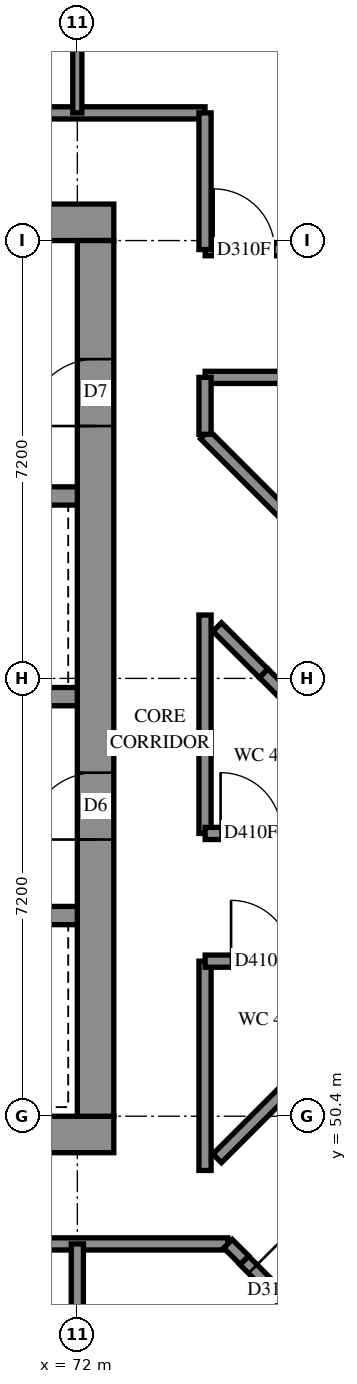
"""IFC4 building model, lengths in metres.
Left out: names, types, materials, properties, quantities, classifications, styles, units other than length and angle.
Written with IfcOpenShell. Run it as: python <this file> out.ifc"""

import sys

from ifc_helpers import new_model, si_unit, direction, frame, frame_2d, origin, place, context, subcontext, project, spatial, rectangle, extrude, element, fill, save


model = new_model("IFC4")
c1 = context("Model", 3, precision=1e-05, world=origin(), true_north=direction((0.0, 1.0)))
c2 = subcontext(c1, "Body", "Model", "MODEL_VIEW")
j1 = project(units=[si_unit("LENGTHUNIT", "METRE"), si_unit("PLANEANGLEUNIT", "RADIAN")], contexts=[c1])
p1 = place(None, origin())
s1 = spatial("IfcSite", under=j1, at=p1, CompositionType="ELEMENT")
p2 = place(p1, origin())
s2 = spatial("IfcBuilding", under=s1, at=p2, CompositionType="ELEMENT")
p3 = place(p2, frame((0.0, 0.0, 172.8)))
s3 = spatial("IfcBuildingStorey", under=s2, at=p3, CompositionType="ELEMENT", Elevation=172.8)
p4 = place(p3, frame((57.0, 50.1, -0.3), z_axis=(0.0, 0.0, 1.0), x_axis=(1.0, 0.0, 0.0)))
e1 = element("IfcWall", 1, at=p4, inside=s3, PredefinedType="SHEAR", context=c2, shape_type="SweptSolid", body=[
    extrude(rectangle(XDim=15.6, YDim=0.6, at=frame_2d((7.8, 0.0))), origin(), (0.0, 0.0, 1.0), 2.7),
])
p5 = place(p3, frame((57.0, 65.1, -0.3), z_axis=(0.0, 0.0, 1.0), x_axis=(1.0, 0.0, 0.0)))
e2 = element("IfcWall", 2, at=p5, inside=s3, PredefinedType="SHEAR", context=c2, shape_type="SweptSolid", body=[
    extrude(rectangle(XDim=15.6, YDim=0.6, at=frame_2d((7.8, 0.0))), origin(), (0.0, 0.0, 1.0), 2.7),
])
p6 = place(p5, frame((10.6, 0.0, 0.3)))
e3 = element("IfcOpeningElement", 3, at=p6, cuts=e2, PredefinedType="OPENING", context=c2, shape_type="SweptSolid", body=[
    extrude(rectangle(XDim=0.8, YDim=2.1, at=frame_2d((0.4, 1.05))), frame((0.0, 0.31, 0.0), z_axis=(0.0, -1.0, 0.0), x_axis=(1.0, 0.0, 0.0)), (0.0, 0.0, 1.0), 0.62),
])
p7 = place(p3, frame((72.3, 50.4, -0.3), z_axis=(0.0, 0.0, 1.0), x_axis=(0.0, 1.0, 0.0)))
e4 = element("IfcWall", 4, at=p7, inside=s3, PredefinedType="SHEAR", context=c2, shape_type="SweptSolid", body=[
    extrude(rectangle(XDim=14.4, YDim=0.6, at=frame_2d((7.2, 0.0))), origin(), (0.0, 0.0, 1.0), 2.7),
])
p8 = place(p7, frame((4.55, 0.0, 0.3)))
e5 = element("IfcOpeningElement", 5, at=p8, cuts=e4, PredefinedType="OPENING", context=c2, shape_type="SweptSolid", body=[
    extrude(rectangle(XDim=1.1, YDim=2.1, at=frame_2d((0.55, 1.05))), frame((0.0, 0.31, 0.0), z_axis=(0.0, -1.0, 0.0), x_axis=(1.0, 0.0, 0.0)), (0.0, 0.0, 1.0), 0.62),
])
p9 = place(p7, frame((11.35, 0.0, 0.3)))
e6 = element("IfcOpeningElement", 6, at=p9, cuts=e4, PredefinedType="OPENING", context=c2, shape_type="SweptSolid", body=[
    extrude(rectangle(XDim=1.1, YDim=2.1, at=frame_2d((0.55, 1.05))), frame((0.0, 0.31, 0.0), z_axis=(0.0, -1.0, 0.0), x_axis=(1.0, 0.0, 0.0)), (0.0, 0.0, 1.0), 0.62),
])
p10 = place(p3, frame((57.6, 53.7, 0.0), z_axis=(0.0, 0.0, 1.0), x_axis=(1.0, 0.0, 0.0)))
e7 = element("IfcWall", 7, at=p10, inside=s3, PredefinedType="SOLIDWALL", context=c2, shape_type="SweptSolid", body=[
    extrude(rectangle(XDim=14.4, YDim=0.3, at=frame_2d((7.2, 0.0))), origin(), (0.0, 0.0, 1.0), 3.1),
])
p11 = place(p10, frame((1.35, 0.0, 0.0)))
e8 = element("IfcOpeningElement", 8, at=p11, cuts=e7, PredefinedType="OPENING", context=c2, shape_type="SweptSolid", body=[
    extrude(rectangle(XDim=0.9, YDim=2.1, at=frame_2d((0.45, 1.05))), frame((0.0, 0.16, 0.0), z_axis=(0.0, -1.0, 0.0), x_axis=(1.0, 0.0, 0.0)), (0.0, 0.0, 1.0), 0.32),
])
p12 = place(p10, frame((4.95, 0.0, 0.0)))
e9 = element("IfcOpeningElement", 9, at=p12, cuts=e7, PredefinedType="OPENING", context=c2, shape_type="SweptSolid", body=[
    extrude(rectangle(XDim=0.9, YDim=2.1, at=frame_2d((0.45, 1.05))), frame((0.0, 0.16, 0.0), z_axis=(0.0, -1.0, 0.0), x_axis=(1.0, 0.0, 0.0)), (0.0, 0.0, 1.0), 0.32),
])
p13 = place(p10, frame((8.55, 0.0, 0.0)))
e10 = element("IfcOpeningElement", 10, at=p13, cuts=e7, PredefinedType="OPENING", context=c2, shape_type="SweptSolid", body=[
    extrude(rectangle(XDim=0.9, YDim=2.1, at=frame_2d((0.45, 1.05))), frame((0.0, 0.16, 0.0), z_axis=(0.0, -1.0, 0.0), x_axis=(1.0, 0.0, 0.0)), (0.0, 0.0, 1.0), 0.32),
])
p14 = place(p10, frame((12.05, 0.0, 0.0)))
e11 = element("IfcOpeningElement", 11, at=p14, cuts=e7, PredefinedType="OPENING", context=c2, shape_type="SweptSolid", body=[
    extrude(rectangle(XDim=1.1, YDim=2.1, at=frame_2d((0.55, 1.05))), frame((0.0, 0.16, 0.0), z_axis=(0.0, -1.0, 0.0), x_axis=(1.0, 0.0, 0.0)), (0.0, 0.0, 1.0), 0.32),
])
p15 = place(p3, frame((57.6, 57.3, 0.0), z_axis=(0.0, 0.0, 1.0), x_axis=(1.0, 0.0, 0.0)))
e12 = element("IfcWall", 12, at=p15, inside=s3, PredefinedType="SOLIDWALL", context=c2, shape_type="SweptSolid", body=[
    extrude(rectangle(XDim=14.4, YDim=0.3, at=frame_2d((7.2, 0.0))), origin(), (0.0, 0.0, 1.0), 3.1),
])
p16 = place(p15, frame((1.25, 0.0, 0.0)))
e13 = element("IfcOpeningElement", 13, at=p16, cuts=e12, PredefinedType="OPENING", context=c2, shape_type="SweptSolid", body=[
    extrude(rectangle(XDim=1.1, YDim=2.1, at=frame_2d((0.55, 1.05))), frame((0.0, 0.16, 0.0), z_axis=(0.0, -1.0, 0.0), x_axis=(1.0, 0.0, 0.0)), (0.0, 0.0, 1.0), 0.32),
])
p17 = place(p15, frame((4.85, 0.0, 0.0)))
e14 = element("IfcOpeningElement", 14, at=p17, cuts=e12, PredefinedType="OPENING", context=c2, shape_type="SweptSolid", body=[
    extrude(rectangle(XDim=1.1, YDim=2.1, at=frame_2d((0.55, 1.05))), frame((0.0, 0.16, 0.0), z_axis=(0.0, -1.0, 0.0), x_axis=(1.0, 0.0, 0.0)), (0.0, 0.0, 1.0), 0.32),
])
p18 = place(p15, frame((8.45, 0.0, 0.0)))
e15 = element("IfcOpeningElement", 15, at=p18, cuts=e12, PredefinedType="OPENING", context=c2, shape_type="SweptSolid", body=[
    extrude(rectangle(XDim=1.1, YDim=2.1, at=frame_2d((0.55, 1.05))), frame((0.0, 0.16, 0.0), z_axis=(0.0, -1.0, 0.0), x_axis=(1.0, 0.0, 0.0)), (0.0, 0.0, 1.0), 0.32),
])
p19 = place(p15, frame((12.05, 0.0, 0.0)))
e16 = element("IfcOpeningElement", 16, at=p19, cuts=e12, PredefinedType="OPENING", context=c2, shape_type="SweptSolid", body=[
    extrude(rectangle(XDim=1.1, YDim=2.1, at=frame_2d((0.55, 1.05))), frame((0.0, 0.16, 0.0), z_axis=(0.0, -1.0, 0.0), x_axis=(1.0, 0.0, 0.0)), (0.0, 0.0, 1.0), 0.32),
])
p20 = place(p3, frame((64.8, 60.6, 0.0), z_axis=(0.0, 0.0, 1.0), x_axis=(1.0, 0.0, 0.0)))
e17 = element("IfcWall", 17, at=p20, inside=s3, PredefinedType="SOLIDWALL", context=c2, shape_type="SweptSolid", body=[
    extrude(rectangle(XDim=7.2, YDim=0.3, at=frame_2d((3.6, 0.0))), origin(), (0.0, 0.0, 1.0), 3.1),
])
p21 = place(p3, frame((55.5, 48.3, 0.0), z_axis=(0.0, 0.0, 1.0), x_axis=(1.0, 0.0, 0.0)))
e18 = element("IfcWall", 18, at=p21, inside=s3, PredefinedType="PARTITIONING", context=c2, shape_type="SweptSolid", body=[
    extrude(rectangle(XDim=18.974, YDim=0.2, at=frame_2d((9.487, 0.0))), origin(), (0.0, 0.0, 1.0), 3.1),
])
p22 = place(p21, frame((5.963, 0.0, 0.0)))
e19 = element("IfcOpeningElement", 19, at=p22, cuts=e18, PredefinedType="OPENING", context=c2, shape_type="SweptSolid", body=[
    extrude(rectangle(XDim=1.0, YDim=2.1, at=frame_2d((0.5, 1.05))), frame((0.0, 0.11, 0.0), z_axis=(0.0, -1.0, 0.0), x_axis=(1.0, 0.0, 0.0)), (0.0, 0.0, 1.0), 0.22),
])
p23 = place(p21, frame((13.161, 0.0, 0.0)))
e20 = element("IfcOpeningElement", 20, at=p23, cuts=e18, PredefinedType="OPENING", context=c2, shape_type="SweptSolid", body=[
    extrude(rectangle(XDim=0.9, YDim=2.1, at=frame_2d((0.45, 1.05))), frame((0.0, 0.11, 0.0), z_axis=(0.0, -1.0, 0.0), x_axis=(1.0, 0.0, 0.0)), (0.0, 0.0, 1.0), 0.22),
])
p24 = place(p3, frame((55.5, 66.9, 0.0), z_axis=(0.0, 0.0, 1.0), x_axis=(1.0, 0.0, 0.0)))
e21 = element("IfcWall", 21, at=p24, inside=s3, PredefinedType="PARTITIONING", context=c2, shape_type="SweptSolid", body=[
    extrude(rectangle(XDim=18.6, YDim=0.2, at=frame_2d((9.3, 0.0))), origin(), (0.0, 0.0, 1.0), 3.1),
])
p25 = place(p24, frame((4.45, 0.0, 0.0)))
e22 = element("IfcOpeningElement", 22, at=p25, cuts=e21, PredefinedType="OPENING", context=c2, shape_type="SweptSolid", body=[
    extrude(rectangle(XDim=0.9, YDim=2.1, at=frame_2d((0.45, 1.05))), frame((0.0, 0.11, 0.0), z_axis=(0.0, -1.0, 0.0), x_axis=(1.0, 0.0, 0.0)), (0.0, 0.0, 1.0), 0.22),
])
p26 = place(p24, frame((6.1, 0.0, 0.0)))
e23 = element("IfcOpeningElement", 23, at=p26, cuts=e21, PredefinedType="OPENING", context=c2, shape_type="SweptSolid", body=[
    extrude(rectangle(XDim=0.9, YDim=2.1, at=frame_2d((0.45, 1.05))), frame((0.0, 0.11, 0.0), z_axis=(0.0, -1.0, 0.0), x_axis=(1.0, 0.0, 0.0)), (0.0, 0.0, 1.0), 0.22),
])
p27 = place(p24, frame((11.65, 0.0, 0.0)))
e24 = element("IfcOpeningElement", 24, at=p27, cuts=e21, PredefinedType="OPENING", context=c2, shape_type="SweptSolid", body=[
    extrude(rectangle(XDim=0.9, YDim=2.1, at=frame_2d((0.45, 1.05))), frame((0.0, 0.11, 0.0), z_axis=(0.0, -1.0, 0.0), x_axis=(1.0, 0.0, 0.0)), (0.0, 0.0, 1.0), 0.22),
])
p28 = place(p24, frame((13.3, 0.0, 0.0)))
e25 = element("IfcOpeningElement", 25, at=p28, cuts=e21, PredefinedType="OPENING", context=c2, shape_type="SweptSolid", body=[
    extrude(rectangle(XDim=0.9, YDim=2.1, at=frame_2d((0.45, 1.05))), frame((0.0, 0.11, 0.0), z_axis=(0.0, -1.0, 0.0), x_axis=(1.0, 0.0, 0.0)), (0.0, 0.0, 1.0), 0.22),
])
p29 = place(p3, frame((74.097, 61.611, 0.0), z_axis=(0.0, 0.0, 1.0), x_axis=(0.7071067812, -0.7071067812, 0.0)))
e26 = element("IfcWall", 26, at=p29, inside=s3, PredefinedType="PARTITIONING", context=c2, shape_type="SweptSolid", body=[
    extrude(rectangle(XDim=8.061, YDim=0.2, at=frame_2d((4.03, 0.0))), origin(), (0.0, 0.0, 1.0), 3.1),
])
p30 = place(p3, frame((74.102, 62.55, 0.0), z_axis=(0.0, 0.0, 1.0), x_axis=(1.0, 0.0, 0.0)))
e27 = element("IfcWall", 27, at=p30, inside=s3, PredefinedType="PARTITIONING", context=c2, shape_type="SweptSolid", body=[
    extrude(rectangle(XDim=5.098, YDim=0.2, at=frame_2d((2.549, 0.0))), origin(), (0.0, 0.0, 1.0), 3.1),
])
p31 = place(p30, frame((1.319, 0.0, 0.0)))
e28 = element("IfcOpeningElement", 28, at=p31, cuts=e27, PredefinedType="OPENING", context=c2, shape_type="SweptSolid", body=[
    extrude(rectangle(XDim=1.0, YDim=2.1, at=frame_2d((0.5, 1.05))), frame((0.0, 0.11, 0.0), z_axis=(0.0, -1.0, 0.0), x_axis=(1.0, 0.0, 0.0)), (0.0, 0.0, 1.0), 0.22),
])
p32 = place(p3, frame((72.0, 43.65, 0.0), z_axis=(0.0, 0.0, 1.0), x_axis=(0.0, 1.0, 0.0)))
e29 = element("IfcWall", 29, at=p32, inside=s3, PredefinedType="PARTITIONING", context=c2, shape_type="SweptSolid", body=[
    extrude(rectangle(XDim=4.65, YDim=0.2, at=frame_2d((2.325, 0.0))), origin(), (0.0, 0.0, 1.0), 3.1),
])
p33 = place(p3, frame((74.102, 64.65, 0.0), z_axis=(0.0, 0.0, 1.0), x_axis=(1.0, 0.0, 0.0)))
e30 = element("IfcWall", 30, at=p33, inside=s3, PredefinedType="PARTITIONING", context=c2, shape_type="SweptSolid", body=[
    extrude(rectangle(XDim=4.648, YDim=0.2, at=frame_2d((2.324, 0.0))), origin(), (0.0, 0.0, 1.0), 3.1),
])
p34 = place(p33, frame((0.14, 0.0, 0.0)))
e31 = element("IfcOpeningElement", 31, at=p34, cuts=e30, PredefinedType="OPENING", context=c2, shape_type="SweptSolid", body=[
    extrude(rectangle(XDim=1.0, YDim=2.1, at=frame_2d((0.5, 1.05))), frame((0.0, 0.11, 0.0), z_axis=(0.0, -1.0, 0.0), x_axis=(1.0, 0.0, 0.0)), (0.0, 0.0, 1.0), 0.22),
])
p35 = place(p3, frame((74.3, 49.706, 0.0), z_axis=(0.0, 0.0, 1.0), x_axis=(0.7071067812, 0.7071067812, 0.0)))
e32 = element("IfcWall", 32, at=p35, inside=s3, PredefinedType="PARTITIONING", context=c2, shape_type="SweptSolid", body=[
    extrude(rectangle(XDim=4.588, YDim=0.2, at=frame_2d((2.294, 0.0))), origin(), (0.0, 0.0, 1.0), 3.1),
])
p36 = place(p3, frame((74.745, 48.029, 0.0), z_axis=(0.0, 0.0, 1.0), x_axis=(0.7068806156, -0.7073328745, 0.0)))
e33 = element("IfcWall", 33, at=p36, inside=s3, PredefinedType="PARTITIONING", context=c2, shape_type="SweptSolid", body=[
    extrude(rectangle(XDim=4.422, YDim=0.2, at=frame_2d((2.211, 0.0))), origin(), (0.0, 0.0, 1.0), 3.1),
])
p37 = place(p36, frame((0.199, 0.0, 0.0)))
e34 = element("IfcOpeningElement", 34, at=p37, cuts=e33, PredefinedType="OPENING", context=c2, shape_type="SweptSolid", body=[
    extrude(rectangle(XDim=1.0, YDim=2.1, at=frame_2d((0.5, 1.05))), frame((0.0, 0.11, 0.0), z_axis=(0.0, -1.0, 0.0), x_axis=(1.0, 0.0, 0.0)), (0.0, 0.0, 1.0), 0.22),
])
p38 = place(p3, frame((74.1, 55.05, 0.0), z_axis=(0.0, 0.0, 1.0), x_axis=(0.0, 1.0, 0.0)))
e35 = element("IfcWall", 35, at=p38, inside=s3, PredefinedType="PARTITIONING", context=c2, shape_type="SweptSolid", body=[
    extrude(rectangle(XDim=3.592, YDim=0.2, at=frame_2d((1.796, 0.0))), origin(), (0.0, 0.0, 1.0), 3.1),
])
p39 = place(p3, frame((74.1, 49.508, 0.0), z_axis=(0.0, 0.0, 1.0), x_axis=(0.0, 1.0, 0.0)))
e36 = element("IfcWall", 36, at=p39, inside=s3, PredefinedType="PARTITIONING", context=c2, shape_type="SweptSolid", body=[
    extrude(rectangle(XDim=3.442, YDim=0.2, at=frame_2d((1.721, 0.0))), origin(), (0.0, 0.0, 1.0), 3.1),
])
p40 = place(p3, frame((74.102, 52.95, 0.0), z_axis=(0.0, 0.0, 1.0), x_axis=(1.0, 0.0, 0.0)))
e37 = element("IfcWall", 37, at=p40, inside=s3, PredefinedType="PARTITIONING", context=c2, shape_type="SweptSolid", body=[
    extrude(rectangle(XDim=3.44, YDim=0.2, at=frame_2d((1.72, 0.0))), origin(), (0.0, 0.0, 1.0), 3.1),
])
p41 = place(p40, frame((0.426, 0.0, 0.0)))
e38 = element("IfcOpeningElement", 38, at=p41, cuts=e37, PredefinedType="OPENING", context=c2, shape_type="SweptSolid", body=[
    extrude(rectangle(XDim=1.0, YDim=2.1, at=frame_2d((0.5, 1.05))), frame((0.0, 0.11, 0.0), z_axis=(0.0, -1.0, 0.0), x_axis=(1.0, 0.0, 0.0)), (0.0, 0.0, 1.0), 0.22),
])
p42 = place(p3, frame((74.102, 55.05, 0.0), z_axis=(0.0, 0.0, 1.0), x_axis=(1.0, 0.0, 0.0)))
e39 = element("IfcWall", 39, at=p42, inside=s3, PredefinedType="PARTITIONING", context=c2, shape_type="SweptSolid", body=[
    extrude(rectangle(XDim=2.794, YDim=0.2, at=frame_2d((1.397, 0.0))), origin(), (0.0, 0.0, 1.0), 3.1),
])
p43 = place(p42, frame((0.254, 0.0, 0.0)))
e40 = element("IfcOpeningElement", 40, at=p43, cuts=e39, PredefinedType="OPENING", context=c2, shape_type="SweptSolid", body=[
    extrude(rectangle(XDim=1.0, YDim=2.1, at=frame_2d((0.5, 1.05))), frame((0.0, 0.11, 0.0), z_axis=(0.0, -1.0, 0.0), x_axis=(1.0, 0.0, 0.0)), (0.0, 0.0, 1.0), 0.22),
])
p44 = place(p3, frame((72.0, 66.9, 0.0), z_axis=(0.0, 0.0, 1.0), x_axis=(0.0, 1.0, 0.0)))
e41 = element("IfcWall", 41, at=p44, inside=s3, PredefinedType="PARTITIONING", context=c2, shape_type="SweptSolid", body=[
    extrude(rectangle(XDim=2.4, YDim=0.15, at=frame_2d((1.2, 0.0))), origin(), (0.0, 0.0, 1.0), 3.1),
])
p45 = place(p3, frame((74.1, 64.652, 0.0), z_axis=(0.0, 0.0, 1.0), x_axis=(0.0, 1.0, 0.0)))
e42 = element("IfcWall", 42, at=p45, inside=s3, PredefinedType="PARTITIONING", context=c2, shape_type="SweptSolid", body=[
    extrude(rectangle(XDim=2.248, YDim=0.2, at=frame_2d((1.124, 0.0))), origin(), (0.0, 0.0, 1.0), 3.1),
])
p46 = place(p3, frame((74.3, 58.444, 0.0), z_axis=(0.0, 0.0, 1.0), x_axis=(0.7080329185, -0.7061794292, 0.0)))
e43 = element("IfcWall", 43, at=p46, inside=s3, PredefinedType="PARTITIONING", context=c2, shape_type="SweptSolid", body=[
    extrude(rectangle(XDim=1.079, YDim=0.2, at=frame_2d((0.539, 0.0))), origin(), (0.0, 0.0, 1.0), 3.1),
])
p47 = place(p3, frame((74.1, 61.614, 0.0), z_axis=(0.0, 0.0, 1.0), x_axis=(0.0, 1.0, 0.0)))
e44 = element("IfcWall", 44, at=p47, inside=s3, PredefinedType="PARTITIONING", context=c2, shape_type="SweptSolid", body=[
    extrude(rectangle(XDim=0.936, YDim=0.2, at=frame_2d((0.468, 0.0))), origin(), (0.0, 0.0, 1.0), 3.1),
])
p48 = place(p3, frame((75.065, 57.683, 0.0), z_axis=(0.0, 0.0, 1.0), x_axis=(0.705788785, -0.7084223253, 0.0)))
e45 = element("IfcWall", 45, at=p48, inside=s3, PredefinedType="PARTITIONING", context=c2, shape_type="SweptSolid", body=[
    extrude(rectangle(XDim=0.759, YDim=0.2, at=frame_2d((0.38, 0.0))), origin(), (0.0, 0.0, 1.0), 3.1),
])
p49 = place(p3, frame((74.477, 48.303, 0.0), z_axis=(0.0, 0.0, 1.0), x_axis=(0.7097111995, -0.7044927348, 0.0)))
e46 = element("IfcWall", 46, at=p49, inside=s3, PredefinedType="PARTITIONING", context=c2, shape_type="SweptSolid", body=[
    extrude(rectangle(XDim=0.383, YDim=0.2, at=frame_2d((0.192, 0.0))), origin(), (0.0, 0.0, 1.0), 3.1),
])
p50 = place(p8, origin())
e47 = element("IfcDoor", 47, at=p50, inside=s3, OperationType="DOUBLE_DOOR_SINGLE_SWING", PredefinedType="DOOR", context=c2, shape_type="SweptSolid", body=[
    extrude(rectangle(XDim=1.1, YDim=2.1, at=frame_2d((0.55, 1.05))), frame((0.0, 0.025, 0.0), z_axis=(0.0, -1.0, 0.0), x_axis=(1.0, 0.0, 0.0)), (0.0, 0.0, 1.0), 0.05),
])
fill(e5, e47)
p51 = place(p9, origin())
e48 = element("IfcDoor", 48, at=p51, inside=s3, OperationType="SINGLE_SWING_RIGHT", PredefinedType="DOOR", context=c2, shape_type="SweptSolid", body=[
    extrude(rectangle(XDim=1.1, YDim=2.1, at=frame_2d((0.55, 1.05))), frame((0.0, 0.025, 0.0), z_axis=(0.0, -1.0, 0.0), x_axis=(1.0, 0.0, 0.0)), (0.0, 0.0, 1.0), 0.05),
])
fill(e6, e48)
p52 = place(p41, origin())
e49 = element("IfcDoor", 49, at=p52, inside=s3, OperationType="SINGLE_SWING_RIGHT", PredefinedType="DOOR", context=c2, shape_type="SweptSolid", body=[
    extrude(rectangle(XDim=1.0, YDim=2.1, at=frame_2d((0.5, 1.05))), frame((0.0, 0.025, 0.0), z_axis=(0.0, -1.0, 0.0), x_axis=(1.0, 0.0, 0.0)), (0.0, 0.0, 1.0), 0.05),
])
fill(e38, e49)
p53 = place(p43, origin())
e50 = element("IfcDoor", 50, at=p53, inside=s3, OperationType="SINGLE_SWING_LEFT", PredefinedType="DOOR", context=c2, shape_type="SweptSolid", body=[
    extrude(rectangle(XDim=1.0, YDim=2.1, at=frame_2d((0.5, 1.05))), frame((0.0, 0.025, 0.0), z_axis=(0.0, -1.0, 0.0), x_axis=(1.0, 0.0, 0.0)), (0.0, 0.0, 1.0), 0.05),
])
fill(e40, e50)
p54 = place(p34, origin())
e51 = element("IfcDoor", 51, at=p54, inside=s3, OperationType="SINGLE_SWING_RIGHT", PredefinedType="DOOR", context=c2, shape_type="SweptSolid", body=[
    extrude(rectangle(XDim=1.0, YDim=2.1, at=frame_2d((0.5, 1.05))), frame((0.0, 0.025, 0.0), z_axis=(0.0, -1.0, 0.0), x_axis=(1.0, 0.0, 0.0)), (0.0, 0.0, 1.0), 0.05),
])
fill(e31, e51)
p55 = place(p37, origin())
e52 = element("IfcDoor", 52, at=p55, inside=s3, OperationType="SINGLE_SWING_LEFT", PredefinedType="DOOR", context=c2, shape_type="SweptSolid", body=[
    extrude(rectangle(XDim=1.0, YDim=2.1, at=frame_2d((0.5, 1.05))), frame((0.0, 0.025, 0.0), z_axis=(0.0, -1.0, 0.0), x_axis=(1.0, 0.0, 0.0)), (0.0, 0.0, 1.0), 0.05),
])
fill(e34, e52)
save(model, sys.argv[1])
